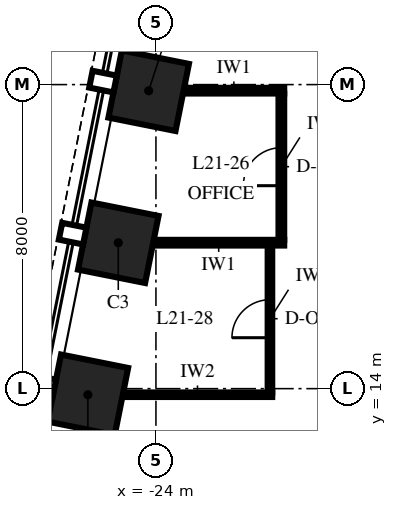
"""IFC4 building model, lengths in metres.
Left out: names, types, materials, properties, quantities, classifications, styles, units other than length and angle.
Written with IfcOpenShell. Run it as: python <this file> out.ifc"""

import sys

from ifc_helpers import new_model, si_unit, direction, frame, frame_2d, origin, origin_2d, place, context, subcontext, project, spatial, rectangle, extrude, element, fill, save


model = new_model("IFC4")
c1 = context("Model", 3, precision=1e-05, world=origin(), true_north=direction((0.0, 1.0)))
c2 = subcontext(c1, "Body", "Model", "MODEL_VIEW")
j1 = project(units=[si_unit("LENGTHUNIT", "METRE"), si_unit("PLANEANGLEUNIT", "RADIAN")], contexts=[c1])
p1 = place(None, origin())
s1 = spatial("IfcSite", under=j1, at=p1, CompositionType="ELEMENT")
p2 = place(p1, origin())
s2 = spatial("IfcBuilding", under=s1, at=p2, CompositionType="ELEMENT")
p3 = place(p2, frame((0.0, 0.0, 98.0)))
s3 = spatial("IfcBuildingStorey", under=s2, at=p3, CompositionType="ELEMENT", Elevation=98.0)
for number, where, z_axis, x_axis in (
    (1, (-24.191, 21.838, 0.0), (0.0, 0.0, 1.0), (-0.196, -0.981, 0.0)),
    (2, (-24.991, 17.838, 0.0), (0.0, 0.0, 1.0), (-0.196, -0.981, 0.0)),
    (3, (-25.791, 13.838, 0.0), (0.0, 0.0, 1.0), (-0.196, -0.981, 0.0)),
):
    element("IfcColumn", number, at=place(p3, frame(where, z_axis=z_axis, x_axis=x_axis)), inside=s3, PredefinedType="COLUMN", context=c2, shape_type="SweptSolid", body=[
        extrude(rectangle(XDim=1.8, YDim=1.8, at=origin_2d()), origin(), (0.0, 0.0, 1.0), 5.0),
    ])
p4 = place(p3, frame((-24.873, 13.84, 0.0), z_axis=(0.0, 0.0, 1.0), x_axis=(1.0, 0.0, 0.0)))
e4 = element("IfcWall", 4, at=p4, inside=s3, PredefinedType="PARTITIONING", context=c2, shape_type="SweptSolid", body=[
    extrude(rectangle(XDim=3.933, YDim=0.12, at=frame_2d((1.966, 0.0))), origin(), (0.0, 0.0, 1.0), 4.25),
])
p5 = place(p3, frame((-24.073, 17.84, 0.0), z_axis=(0.0, 0.0, 1.0), x_axis=(1.0, 0.0, 0.0)))
e5 = element("IfcWall", 5, at=p5, inside=s3, PredefinedType="PARTITIONING", context=c2, shape_type="SweptSolid", body=[
    extrude(rectangle(XDim=3.448, YDim=0.15, at=frame_2d((1.724, 0.0))), origin(), (0.0, 0.0, 1.0), 4.25),
])
p6 = place(p3, frame((-23.273, 21.84, 0.0), z_axis=(0.0, 0.0, 1.0), x_axis=(1.0, 0.0, 0.0)))
e6 = element("IfcWall", 6, at=p6, inside=s3, PredefinedType="PARTITIONING", context=c2, shape_type="SweptSolid", body=[
    extrude(rectangle(XDim=2.648, YDim=0.15, at=frame_2d((1.324, 0.0))), origin(), (0.0, 0.0, 1.0), 4.25),
])
p7 = place(p3, frame((-21.0, 13.9, 0.0), z_axis=(0.0, 0.0, 1.0), x_axis=(0.0, 1.0, 0.0)))
e7 = element("IfcWall", 7, at=p7, inside=s3, PredefinedType="PARTITIONING", context=c2, shape_type="SweptSolid", body=[
    extrude(rectangle(XDim=3.865, YDim=0.12, at=frame_2d((1.933, 0.0))), origin(), (0.0, 0.0, 1.0), 4.25),
])
p8 = place(p7, frame((1.44, 0.0, 0.0)))
e8 = element("IfcOpeningElement", 8, at=p8, cuts=e7, PredefinedType="OPENING", context=c2, shape_type="SweptSolid", body=[
    extrude(rectangle(XDim=1.0, YDim=2.4, at=frame_2d((0.5, 1.2))), frame((0.0, 0.075, 0.0), z_axis=(0.0, -1.0, 0.0), x_axis=(1.0, 0.0, 0.0)), (0.0, 0.0, 1.0), 0.15),
])
p9 = place(p3, frame((-20.7, 17.915, 0.0), z_axis=(0.0, 0.0, 1.0), x_axis=(0.0, 1.0, 0.0)))
e9 = element("IfcWall", 9, at=p9, inside=s3, PredefinedType="PARTITIONING", context=c2, shape_type="SweptSolid", body=[
    extrude(rectangle(XDim=3.85, YDim=0.15, at=frame_2d((1.925, 0.0))), origin(), (0.0, 0.0, 1.0), 4.25),
])
p10 = place(p9, frame((1.425, 0.0, 0.0)))
e10 = element("IfcOpeningElement", 10, at=p10, cuts=e9, PredefinedType="OPENING", context=c2, shape_type="SweptSolid", body=[
    extrude(rectangle(XDim=1.0, YDim=2.3, at=frame_2d((0.5, 1.15))), frame((0.0, 0.09, 0.0), z_axis=(0.0, -1.0, 0.0), x_axis=(1.0, 0.0, 0.0)), (0.0, 0.0, 1.0), 0.18),
])
p11 = place(p8, origin())
e11 = element("IfcDoor", 11, at=p11, inside=s3, OperationType="SINGLE_SWING_RIGHT", PredefinedType="DOOR", context=c2, shape_type="SweptSolid", body=[
    extrude(rectangle(XDim=1.0, YDim=2.4, at=frame_2d((0.5, 1.2))), frame((0.0, 0.06, 0.0), z_axis=(0.0, -1.0, 0.0), x_axis=(1.0, 0.0, 0.0)), (0.0, 0.0, 1.0), 0.12),
])
fill(e8, e11)
p12 = place(p10, origin())
e12 = element("IfcDoor", 12, at=p12, inside=s3, OperationType="SINGLE_SWING_LEFT", PredefinedType="DOOR", context=c2, shape_type="SweptSolid", body=[
    extrude(rectangle(XDim=1.0, YDim=2.3, at=frame_2d((0.5, 1.15))), frame((0.0, 0.075, 0.0), z_axis=(0.0, -1.0, 0.0), x_axis=(1.0, 0.0, 0.0)), (0.0, 0.0, 1.0), 0.149),
])
fill(e10, e12)
save(model, sys.argv[1])
